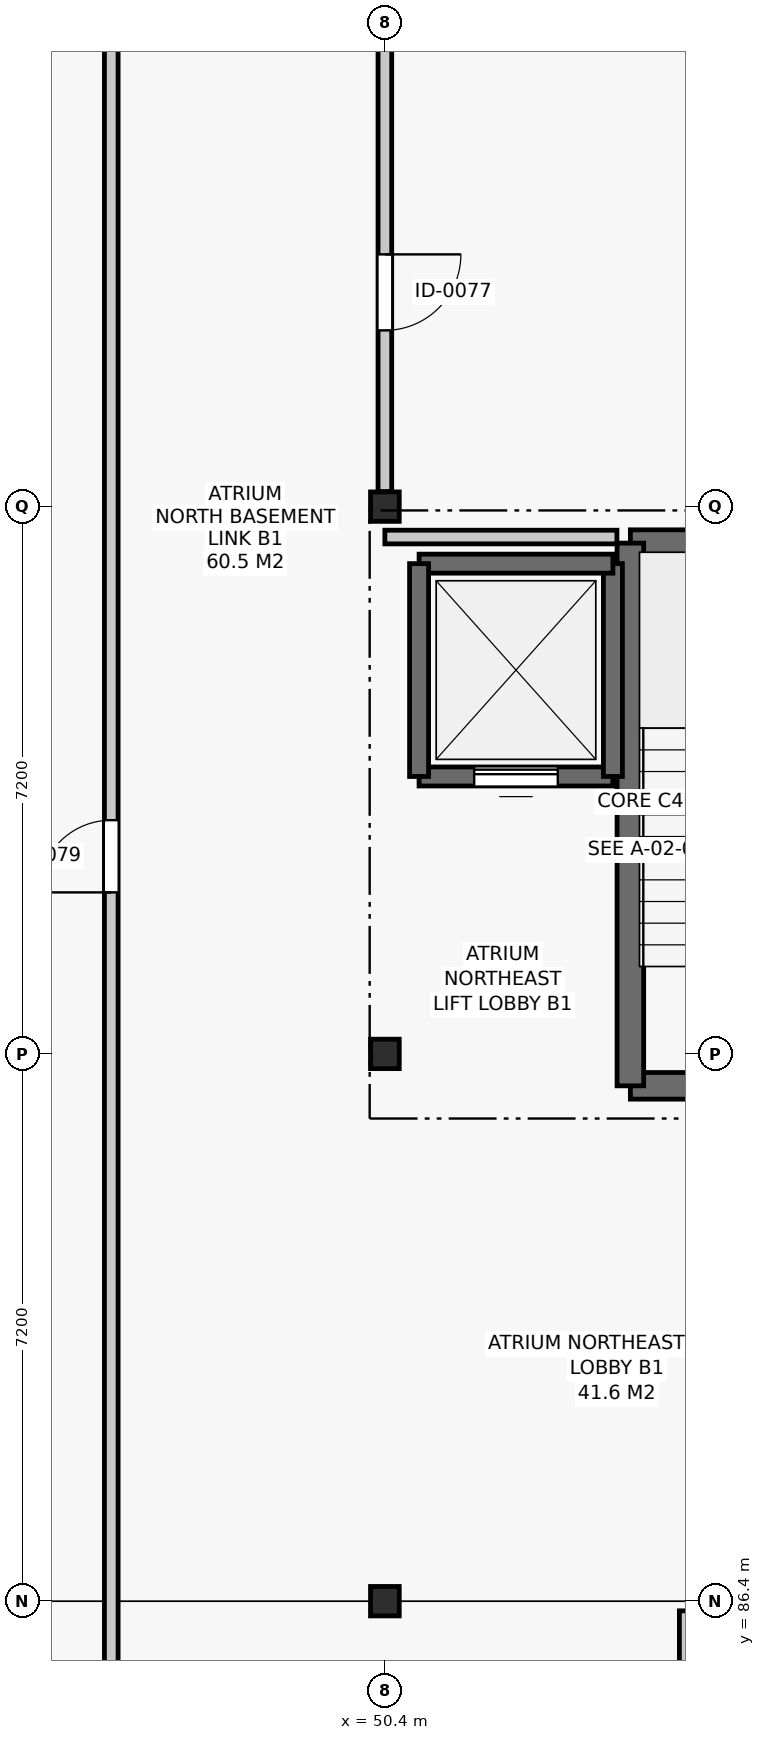
"""IFC4 building model, lengths in metres.
Left out: names, types, materials, properties, quantities, classifications, styles, units other than length and angle.
Written with IfcOpenShell. Run it as: python <this file> out.ifc"""

import sys

from ifc_helpers import new_model, si_unit, direction, frame, frame_2d, origin, origin_2d, place, context, subcontext, project, spatial, rectangle, i_section, extrude, element, fill, save


model = new_model("IFC4")
c1 = context("Model", 3, precision=1e-05, world=origin(), true_north=direction((0.0, 1.0)))
c2 = subcontext(c1, "Body", "Model", "MODEL_VIEW")
j1 = project(units=[si_unit("LENGTHUNIT", "METRE"), si_unit("PLANEANGLEUNIT", "RADIAN")], contexts=[c1])
p1 = place(None, origin())
s1 = spatial("IfcSite", under=j1, at=p1, CompositionType="ELEMENT")
p2 = place(p1, origin())
s2 = spatial("IfcBuilding", under=s1, at=p2, CompositionType="ELEMENT")
p3 = place(p2, frame((0.0, 0.0, -4.2)))
s3 = spatial("IfcBuildingStorey", under=s2, at=p3, CompositionType="ELEMENT", Elevation=-4.2)
for number, where, z_axis, x_axis in (
    (1, (50.4, 86.4, 0.0), (0.0, 0.0, 1.0), (1.0, 0.0, 0.0)),
    (2, (50.4, 93.6, 0.0), (0.0, 0.0, 1.0), (1.0, 0.0, 0.0)),
    (3, (50.4, 100.8, 0.0), (0.0, 0.0, 1.0), (1.0, 0.0, 0.0)),
):
    element("IfcColumn", number, at=place(p3, frame(where, z_axis=z_axis, x_axis=x_axis)), inside=s3, PredefinedType="COLUMN", context=c2, shape_type="SweptSolid", body=[
        extrude(i_section(OverallWidth=0.378, OverallDepth=0.387, WebThickness=0.018, FlangeThickness=0.029, FilletRadius=0.015, at=origin_2d()), origin(), (0.0, 0.0, 1.0), 4.2),
    ])
p4 = place(p3, frame((53.63, 93.18, 0.0), z_axis=(0.0, 0.0, 1.0), x_axis=(1.0, 0.0, 0.0)))
e4 = element("IfcWall", 4, at=p4, inside=s3, PredefinedType="SHEAR", context=c2, shape_type="SweptSolid", body=[
    extrude(rectangle(XDim=3.44, YDim=0.35, at=frame_2d((1.72, 0.0))), origin(), (0.0, 0.0, 1.0), 3.88),
])
p5 = place(p4, frame((1.17, 0.0, 0.0)))
e5 = element("IfcOpeningElement", 5, at=p5, cuts=e4, PredefinedType="OPENING", context=c2, shape_type="SweptSolid", body=[
    extrude(rectangle(XDim=1.1, YDim=2.15, at=frame_2d((0.55, 1.075))), frame((0.0, 0.187, 0.0), z_axis=(0.0, -1.0, 0.0), x_axis=(1.0, 0.0, 0.0)), (0.0, 0.0, 1.0), 0.374),
])
p6 = place(p3, frame((57.07, 100.32, 0.0), z_axis=(0.0, 0.0, 1.0), x_axis=(-1.0, 0.0, 0.0)))
e6 = element("IfcWall", 6, at=p6, inside=s3, PredefinedType="SHEAR", context=c2, shape_type="SweptSolid", body=[
    extrude(rectangle(XDim=3.44, YDim=0.35, at=frame_2d((1.72, 0.0))), origin(), (0.0, 0.0, 1.0), 3.88),
])
p7 = place(p3, frame((53.63, 100.32, 0.0), z_axis=(0.0, 0.0, 1.0), x_axis=(0.0, -1.0, 0.0)))
e7 = element("IfcWall", 7, at=p7, inside=s3, PredefinedType="SHEAR", context=c2, shape_type="SweptSolid", body=[
    extrude(rectangle(XDim=7.14, YDim=0.35, at=frame_2d((3.57, 0.0))), origin(), (0.0, 0.0, 1.0), 3.88),
])
p8 = place(p3, frame((50.85, 97.25, 0.0), z_axis=(0.0, 0.0, 1.0), x_axis=(1.0, 0.0, 0.0)))
e8 = element("IfcWall", 8, at=p8, inside=s3, PredefinedType="SHEAR", context=c2, shape_type="SweptSolid", body=[
    extrude(rectangle(XDim=2.55, YDim=0.25, at=frame_2d((1.275, 0.0))), origin(), (0.0, 0.0, 1.0), 3.88),
])
p9 = place(p8, frame((0.725, 0.0, 0.0)))
e9 = element("IfcOpeningElement", 9, at=p9, cuts=e8, PredefinedType="OPENING", context=c2, shape_type="SweptSolid", body=[
    extrude(rectangle(XDim=1.1, YDim=2.1, at=frame_2d((0.55, 1.05))), frame((0.0, 0.137, 0.0), z_axis=(0.0, -1.0, 0.0), x_axis=(1.0, 0.0, 0.0)), (0.0, 0.0, 1.0), 0.274),
])
p10 = place(p3, frame((53.4, 97.25, 0.0), z_axis=(0.0, 0.0, 1.0), x_axis=(0.0, 1.0, 0.0)))
e10 = element("IfcWall", 10, at=p10, inside=s3, PredefinedType="SHEAR", context=c2, shape_type="SweptSolid", body=[
    extrude(rectangle(XDim=2.8, YDim=0.25, at=frame_2d((1.4, 0.0))), origin(), (0.0, 0.0, 1.0), 3.88),
])
p11 = place(p3, frame((53.4, 100.05, 0.0), z_axis=(0.0, 0.0, 1.0), x_axis=(-1.0, 0.0, 0.0)))
e11 = element("IfcWall", 11, at=p11, inside=s3, PredefinedType="SHEAR", context=c2, shape_type="SweptSolid", body=[
    extrude(rectangle(XDim=2.55, YDim=0.25, at=frame_2d((1.275, 0.0))), origin(), (0.0, 0.0, 1.0), 3.88),
])
p12 = place(p3, frame((50.85, 100.05, 0.0), z_axis=(0.0, 0.0, 1.0), x_axis=(0.0, -1.0, 0.0)))
e12 = element("IfcWall", 12, at=p12, inside=s3, PredefinedType="SHEAR", context=c2, shape_type="SweptSolid", body=[
    extrude(rectangle(XDim=2.8, YDim=0.25, at=frame_2d((1.4, 0.0))), origin(), (0.0, 0.0, 1.0), 3.88),
])
p13 = place(p3, frame((50.4, 100.4, 0.0), z_axis=(0.0, 0.0, 1.0), x_axis=(1.0, 0.0, 0.0)))
e13 = element("IfcWall", 13, at=p13, inside=s3, PredefinedType="PARTITIONING", context=c2, shape_type="SweptSolid", body=[
    extrude(rectangle(XDim=3.053, YDim=0.18, at=frame_2d((1.526, 0.0))), origin(), (0.0, 0.0, 1.0), 3.425),
])
p14 = place(p3, frame((50.4, 100.998, 0.0), z_axis=(0.0, 0.0, 1.0), x_axis=(0.0, 1.0, 0.0)))
e14 = element("IfcWall", 14, at=p14, inside=s3, PredefinedType="PARTITIONING", context=c2, shape_type="SweptSolid", body=[
    extrude(rectangle(XDim=6.805, YDim=0.18, at=frame_2d((3.402, 0.0))), origin(), (0.0, 0.0, 1.0), 3.425),
])
p15 = place(p14, frame((2.121, 0.0, 0.0)))
e15 = element("IfcOpeningElement", 15, at=p15, cuts=e14, PredefinedType="OPENING", context=c2, shape_type="SweptSolid", body=[
    extrude(rectangle(XDim=1.0, YDim=2.15, at=frame_2d((0.5, 1.075))), frame((0.0, 0.102, 0.0), z_axis=(0.0, -1.0, 0.0), x_axis=(1.0, 0.0, 0.0)), (0.0, 0.0, 1.0), 0.204),
])
p16 = place(p3, frame((54.4, 60.727, 0.0), z_axis=(0.0, 0.0, 1.0), x_axis=(0.0, 1.0, 0.0)))
e16 = element("IfcWall", 16, at=p16, inside=s3, PredefinedType="SOLIDWALL", context=c2, shape_type="SweptSolid", body=[
    extrude(rectangle(XDim=25.546, YDim=0.25, at=frame_2d((12.773, 0.0))), origin(), (0.0, 0.0, 1.0), 3.375),
])
p17 = place(p16, frame((12.023, 0.0, 0.0)))
e17 = element("IfcOpeningElement", 17, at=p17, cuts=e16, PredefinedType="OPENING", context=c2, shape_type="SweptSolid", body=[
    extrude(rectangle(XDim=1.5, YDim=2.2, at=frame_2d((0.75, 1.1))), frame((0.0, 0.137, 0.0), z_axis=(0.0, -1.0, 0.0), x_axis=(1.0, 0.0, 0.0)), (0.0, 0.0, 1.0), 0.274),
])
p18 = place(p3, frame((46.8, 65.492, 0.0), z_axis=(0.0, 0.0, 1.0), x_axis=(0.0, 1.0, 0.0)))
e18 = element("IfcWall", 18, at=p18, inside=s3, PredefinedType="PARTITIONING", context=c2, shape_type="SweptSolid", body=[
    extrude(rectangle(XDim=49.483, YDim=0.18, at=frame_2d((24.742, 0.0))), origin(), (0.0, 0.0, 1.0), 3.375),
])
p19 = place(p18, frame((30.233, 0.0, 0.0)))
e19 = element("IfcOpeningElement", 19, at=p19, cuts=e18, PredefinedType="OPENING", context=c2, shape_type="SweptSolid", body=[
    extrude(rectangle(XDim=0.95, YDim=2.15, at=frame_2d((0.475, 1.075))), frame((0.0, 0.102, 0.0), z_axis=(0.0, -1.0, 0.0), x_axis=(1.0, 0.0, 0.0)), (0.0, 0.0, 1.0), 0.204),
])
p20 = place(p9, origin())
e20 = element("IfcDoor", 20, at=p20, inside=s3, OperationType="SLIDING_TO_LEFT", PredefinedType="DOOR", context=c2, shape_type="SweptSolid", body=[
    extrude(rectangle(XDim=1.1, YDim=2.1, at=frame_2d((0.55, 1.05))), frame((0.0, 0.025, 0.0), z_axis=(0.0, -1.0, 0.0), x_axis=(1.0, 0.0, 0.0)), (0.0, 0.0, 1.0), 0.05),
])
fill(e9, e20)
p21 = place(p15, frame((1.0, 0.0, 0.0), z_axis=(0.0, 0.0, 1.0), x_axis=(-1.0, 0.0, 0.0)))
e21 = element("IfcDoor", 21, at=p21, inside=s3, OperationType="SINGLE_SWING_LEFT", PredefinedType="DOOR", context=c2, shape_type="SweptSolid", body=[
    extrude(rectangle(XDim=1.0, YDim=2.15, at=frame_2d((0.5, 1.075))), frame((0.0, 0.025, 0.0), z_axis=(0.0, -1.0, 0.0), x_axis=(1.0, 0.0, 0.0)), (0.0, 0.0, 1.0), 0.05),
])
fill(e15, e21)
p22 = place(p19, origin())
e22 = element("IfcDoor", 22, at=p22, inside=s3, OperationType="SINGLE_SWING_LEFT", PredefinedType="DOOR", context=c2, shape_type="SweptSolid", body=[
    extrude(rectangle(XDim=0.95, YDim=2.15, at=frame_2d((0.475, 1.075))), frame((0.0, 0.025, 0.0), z_axis=(0.0, -1.0, 0.0), x_axis=(1.0, 0.0, 0.0)), (0.0, 0.0, 1.0), 0.05),
])
fill(e19, e22)
save(model, sys.argv[1])
